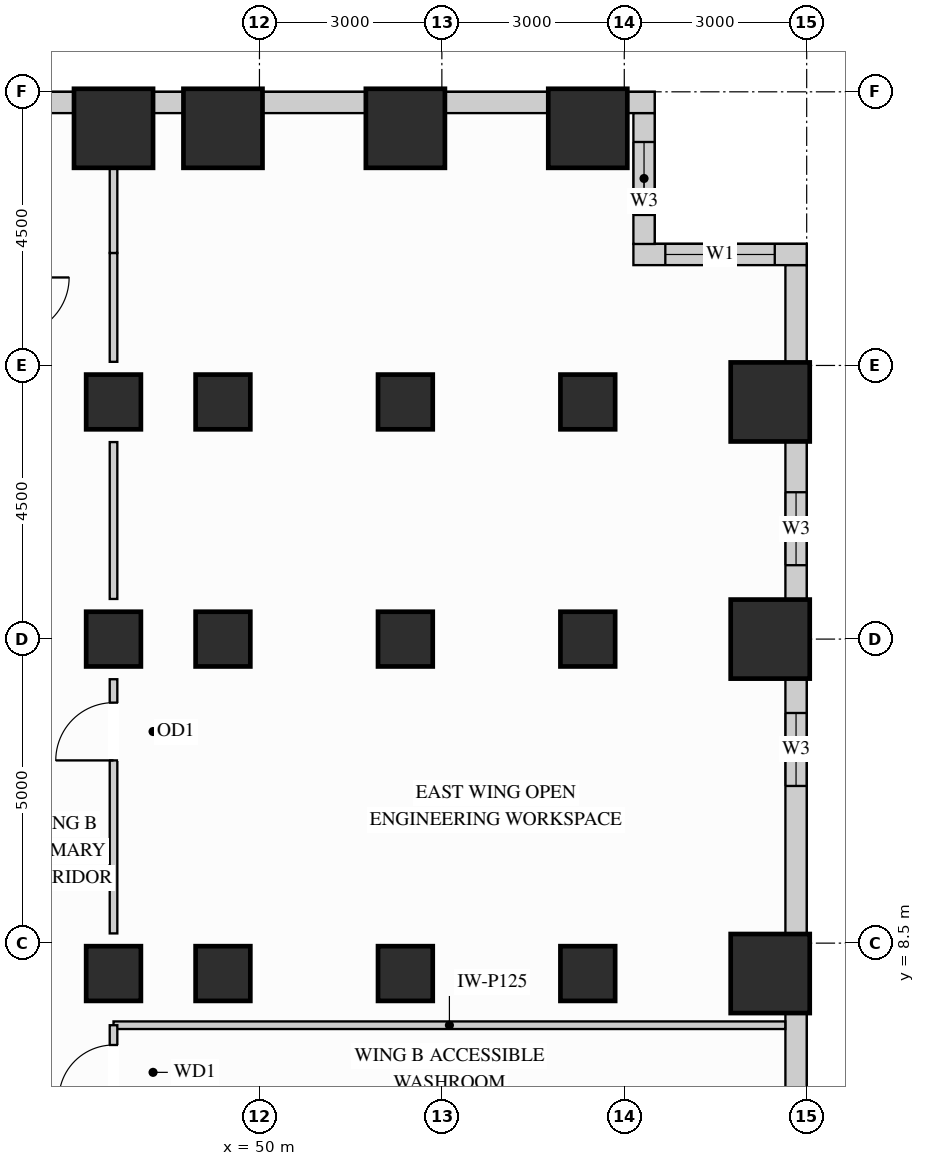
"""IFC4 building model, lengths in metres.
Left out: names, types, materials, properties, quantities, classifications, styles, units other than length and angle.
Written with IfcOpenShell. Run it as: python <this file> out.ifc"""

import sys

from ifc_helpers import new_model, si_unit, direction, frame, frame_2d, origin, origin_2d, place, context, subcontext, project, spatial, rectangle, extrude, source, transform, mapped, element, fill, save


model = new_model("IFC4")
c1 = context("Model", 3, precision=1e-05, world=origin(), true_north=direction((0.0, 1.0)))
c2 = subcontext(c1, "Body", "Model", "MODEL_VIEW")
j1 = project(units=[si_unit("LENGTHUNIT", "METRE"), si_unit("PLANEANGLEUNIT", "RADIAN")], contexts=[c1])
p1 = place(None, origin())
s1 = spatial("IfcSite", under=j1, at=p1, CompositionType="ELEMENT")
p2 = place(p1, origin())
s2 = spatial("IfcBuilding", under=s1, at=p2, CompositionType="ELEMENT")
p3 = place(p2, frame((0.0, 0.0, 44.1)))
s3 = spatial("IfcBuildingStorey", under=s2, at=p3, CompositionType="ELEMENT", Elevation=44.1)
m1 = source(origin(), c2, "Body", "SweptSolid", [
    extrude(rectangle(XDim=0.9, YDim=0.9, at=origin_2d()), origin(), (0.0, 0.0, 1.0), 3.38),
])
for number, where, z_axis, x_axis in (
    (1, (47.6, 13.5, 0.0), (0.0, 0.0, 1.0), (1.0, 0.0, 0.0)),
    (2, (47.6, 8.0, 0.0), (0.0, 0.0, 1.0), (1.0, 0.0, 0.0)),
    (3, (47.6, 17.4, 0.0), (0.0, 0.0, 1.0), (1.0, 0.0, 0.0)),
    (4, (49.4, 13.5, 0.0), (0.0, 0.0, 1.0), (1.0, 0.0, 0.0)),
    (5, (49.4, 17.4, 0.0), (0.0, 0.0, 1.0), (1.0, 0.0, 0.0)),
    (6, (49.4, 8.0, 0.0), (0.0, 0.0, 1.0), (1.0, 0.0, 0.0)),
    (7, (52.4, 13.5, 0.0), (0.0, 0.0, 1.0), (1.0, 0.0, 0.0)),
    (8, (52.4, 17.4, 0.0), (0.0, 0.0, 1.0), (1.0, 0.0, 0.0)),
    (9, (52.4, 8.0, 0.0), (0.0, 0.0, 1.0), (1.0, 0.0, 0.0)),
    (10, (55.4, 13.5, 0.0), (0.0, 0.0, 1.0), (1.0, 0.0, 0.0)),
    (11, (55.4, 17.4, 0.0), (0.0, 0.0, 1.0), (1.0, 0.0, 0.0)),
    (12, (55.4, 8.0, 0.0), (0.0, 0.0, 1.0), (1.0, 0.0, 0.0)),
):
    element("IfcColumn", number, at=place(p3, frame(where, z_axis=z_axis, x_axis=x_axis)), inside=s3, PredefinedType="COLUMN", context=c2, shape_type="MappedRepresentation", body=[
        mapped(m1, transform((0.0, 0.0, 0.0), x_axis=(1.0, 0.0, 0.0), y_axis=(0.0, 1.0, 0.0), z_axis=(0.0, 0.0, 1.0))),
    ])
m2 = source(origin(), c2, "Body", "SweptSolid", [
    extrude(rectangle(XDim=1.3, YDim=1.3, at=origin_2d()), origin(), (0.0, 0.0, 1.0), 3.38),
])
for number, where, z_axis, x_axis in (
    (13, (47.6, 21.9, 0.0), (0.0, 0.0, 1.0), (1.0, 0.0, 0.0)),
    (14, (49.4, 21.9, 0.0), (0.0, 0.0, 1.0), (1.0, 0.0, 0.0)),
    (15, (52.4, 21.9, 0.0), (0.0, 0.0, 1.0), (1.0, 0.0, 0.0)),
    (16, (55.4, 21.9, 0.0), (0.0, 0.0, 1.0), (1.0, 0.0, 0.0)),
    (17, (58.4, 13.5, 0.0), (0.0, 0.0, 1.0), (1.0, 0.0, 0.0)),
    (18, (58.4, 17.4, 0.0), (0.0, 0.0, 1.0), (1.0, 0.0, 0.0)),
    (19, (58.4, 8.0, 0.0), (0.0, 0.0, 1.0), (1.0, 0.0, 0.0)),
):
    element("IfcColumn", number, at=place(p3, frame(where, z_axis=z_axis, x_axis=x_axis)), inside=s3, PredefinedType="COLUMN", context=c2, shape_type="MappedRepresentation", body=[
        mapped(m2, transform((0.0, 0.0, 0.0), x_axis=(1.0, 0.0, 0.0), y_axis=(0.0, 1.0, 0.0), z_axis=(0.0, 0.0, 1.0))),
    ])
m3 = source(origin(), c2, "Body", "SweptSolid", [
    extrude(rectangle(XDim=3.204, YDim=0.35, at=frame_2d((1.602, 0.0))), origin(), (0.0, 0.0, 1.0), 2.51),
])
p4 = place(p3, frame((58.825, 4.148, 0.0), z_axis=(0.0, 0.0, 1.0), x_axis=(0.0, 1.0, 0.0)))
e20 = element("IfcWall", 20, at=p4, inside=s3, PredefinedType="SOLIDWALL", context=c2, shape_type="MappedRepresentation", body=[
    mapped(m3, transform((0.0, 0.0, 0.0), x_axis=(1.0, 0.0, 0.0), y_axis=(0.0, 1.0, 0.0), z_axis=(0.0, 0.0, 1.0))),
])
p5 = place(p3, frame((58.825, 8.648, 0.0), z_axis=(0.0, 0.0, 1.0), x_axis=(0.0, 1.0, 0.0)))
e21 = element("IfcWall", 21, at=p5, inside=s3, PredefinedType="SOLIDWALL", context=c2, shape_type="SweptSolid", body=[
    extrude(rectangle(XDim=4.204, YDim=0.35, at=frame_2d((2.102, 0.0))), origin(), (0.0, 0.0, 1.0), 2.51),
])
p6 = place(p5, frame((2.437, 0.0, 0.78)))
e22 = element("IfcOpeningElement", 22, at=p6, cuts=e21, PredefinedType="OPENING", context=c2, shape_type="SweptSolid", body=[
    extrude(rectangle(XDim=1.2, YDim=1.55, at=frame_2d((0.6, 0.775))), frame((0.0, 0.185, 0.0), z_axis=(0.0, -1.0, 0.0), x_axis=(1.0, 0.0, 0.0)), (0.0, 0.0, 1.0), 0.37),
])
p7 = place(p3, frame((58.825, 14.148, 0.0), z_axis=(0.0, 0.0, 1.0), x_axis=(0.0, 1.0, 0.0)))
e23 = element("IfcWall", 23, at=p7, inside=s3, PredefinedType="SOLIDWALL", context=c2, shape_type="SweptSolid", body=[
    extrude(rectangle(XDim=2.604, YDim=0.35, at=frame_2d((1.302, 0.0))), origin(), (0.0, 0.0, 1.0), 2.51),
])
p8 = place(p7, frame((0.567, 0.0, 0.78)))
e24 = element("IfcOpeningElement", 24, at=p8, cuts=e23, PredefinedType="OPENING", context=c2, shape_type="SweptSolid", body=[
    extrude(rectangle(XDim=1.2, YDim=1.55, at=frame_2d((0.6, 0.775))), frame((0.0, 0.185, 0.0), z_axis=(0.0, -1.0, 0.0), x_axis=(1.0, 0.0, 0.0)), (0.0, 0.0, 1.0), 0.37),
])
m4 = source(origin(), c2, "Body", "SweptSolid", [
    extrude(rectangle(XDim=1.604, YDim=0.35, at=frame_2d((0.802, 0.0))), origin(), (0.0, 0.0, 1.0), 3.365),
])
p9 = place(p3, frame((58.825, 18.048, 0.0), z_axis=(0.0, 0.0, 1.0), x_axis=(0.0, 1.0, 0.0)))
e25 = element("IfcWall", 25, at=p9, inside=s3, PredefinedType="SOLIDWALL", context=c2, shape_type="MappedRepresentation", body=[
    mapped(m4, transform((0.0, 0.0, 0.0), x_axis=(1.0, 0.0, 0.0), y_axis=(0.0, 1.0, 0.0), z_axis=(0.0, 0.0, 1.0))),
])
p10 = place(p3, frame((59.0, 19.825, 0.0), z_axis=(0.0, 0.0, 1.0), x_axis=(-1.0, 0.0, 0.0)))
e26 = element("IfcWall", 26, at=p10, inside=s3, PredefinedType="SOLIDWALL", context=c2, shape_type="SweptSolid", body=[
    extrude(rectangle(XDim=2.85, YDim=0.35, at=frame_2d((1.425, 0.0))), origin(), (0.0, 0.0, 1.0), 3.365),
])
p11 = place(p10, frame((0.525, 0.0, 0.78)))
e27 = element("IfcOpeningElement", 27, at=p11, cuts=e26, PredefinedType="OPENING", context=c2, shape_type="SweptSolid", body=[
    extrude(rectangle(XDim=1.8, YDim=2.1, at=frame_2d((0.9, 1.05))), frame((0.0, 0.185, 0.0), z_axis=(0.0, -1.0, 0.0), x_axis=(1.0, 0.0, 0.0)), (0.0, 0.0, 1.0), 0.37),
])
p12 = place(p3, frame((56.325, 19.998, 0.0), z_axis=(0.0, 0.0, 1.0), x_axis=(0.0, 1.0, 0.0)))
e28 = element("IfcWall", 28, at=p12, inside=s3, PredefinedType="SOLIDWALL", context=c2, shape_type="SweptSolid", body=[
    extrude(rectangle(XDim=2.154, YDim=0.35, at=frame_2d((1.077, 0.0))), origin(), (0.0, 0.0, 1.0), 3.365),
])
p13 = place(p12, frame((0.477, 0.0, 0.78)))
e29 = element("IfcOpeningElement", 29, at=p13, cuts=e28, PredefinedType="OPENING", context=c2, shape_type="SweptSolid", body=[
    extrude(rectangle(XDim=1.2, YDim=2.1, at=frame_2d((0.6, 1.05))), frame((0.0, 0.185, 0.0), z_axis=(0.0, -1.0, 0.0), x_axis=(1.0, 0.0, 0.0)), (0.0, 0.0, 1.0), 0.37),
])
m5 = source(origin(), c2, "Body", "SweptSolid", [
    extrude(rectangle(XDim=0.452, YDim=0.35, at=frame_2d((0.226, 0.0))), origin(), (0.0, 0.0, 1.0), 3.365),
])
p14 = place(p3, frame((56.5, 22.325, 0.0), z_axis=(0.0, 0.0, 1.0), x_axis=(-1.0, 0.0, 0.0)))
e30 = element("IfcWall", 30, at=p14, inside=s3, PredefinedType="SOLIDWALL", context=c2, shape_type="MappedRepresentation", body=[
    mapped(m5, transform((0.0, 0.0, 0.0), x_axis=(1.0, 0.0, 0.0), y_axis=(0.0, 1.0, 0.0), z_axis=(0.0, 0.0, 1.0))),
])
m6 = source(origin(), c2, "Body", "SweptSolid", [
    extrude(rectangle(XDim=1.704, YDim=0.35, at=frame_2d((0.852, 0.0))), origin(), (0.0, 0.0, 1.0), 2.51),
])
for number, where, z_axis, x_axis in (
    (31, (54.752, 22.325, 0.0), (0.0, 0.0, 1.0), (-1.0, 0.0, 0.0)),
    (32, (51.752, 22.325, 0.0), (0.0, 0.0, 1.0), (-1.0, 0.0, 0.0)),
):
    element("IfcWall", number, at=place(p3, frame(where, z_axis=z_axis, x_axis=x_axis)), inside=s3, PredefinedType="SOLIDWALL", context=c2, shape_type="MappedRepresentation", body=[
        mapped(m6, transform((0.0, 0.0, 0.0), x_axis=(1.0, 0.0, 0.0), y_axis=(0.0, 1.0, 0.0), z_axis=(0.0, 0.0, 1.0))),
    ])
m7 = source(origin(), c2, "Body", "SweptSolid", [
    extrude(rectangle(XDim=0.504, YDim=0.35, at=frame_2d((0.252, 0.0))), origin(), (0.0, 0.0, 1.0), 3.365),
])
p15 = place(p3, frame((48.752, 22.325, 0.0), z_axis=(0.0, 0.0, 1.0), x_axis=(-1.0, 0.0, 0.0)))
e33 = element("IfcWall", 33, at=p15, inside=s3, PredefinedType="SOLIDWALL", context=c2, shape_type="MappedRepresentation", body=[
    mapped(m7, transform((0.0, 0.0, 0.0), x_axis=(1.0, 0.0, 0.0), y_axis=(0.0, 1.0, 0.0), z_axis=(0.0, 0.0, 1.0))),
])
p16 = place(p3, frame((46.952, 22.325, 0.0), z_axis=(0.0, 0.0, 1.0), x_axis=(-1.0, 0.0, 0.0)))
e34 = element("IfcWall", 34, at=p16, inside=s3, PredefinedType="SOLIDWALL", context=c2, shape_type="SweptSolid", body=[
    extrude(rectangle(XDim=6.304, YDim=0.35, at=frame_2d((3.152, 0.0))), origin(), (0.0, 0.0, 1.0), 2.51),
])
p17 = place(p16, frame((1.649, 0.0, 0.78)))
e35 = element("IfcOpeningElement", 35, at=p17, cuts=e34, PredefinedType="OPENING", context=c2, shape_type="SweptSolid", body=[
    extrude(rectangle(XDim=1.8, YDim=1.55, at=frame_2d((0.9, 0.775))), frame((0.0, 0.185, 0.0), z_axis=(0.0, -1.0, 0.0), x_axis=(1.0, 0.0, 0.0)), (0.0, 0.0, 1.0), 0.37),
])
p18 = place(p16, frame((3.817, 0.0, 0.78)))
e36 = element("IfcOpeningElement", 36, at=p18, cuts=e34, PredefinedType="OPENING", context=c2, shape_type="SweptSolid", body=[
    extrude(rectangle(XDim=1.8, YDim=1.55, at=frame_2d((0.9, 0.775))), frame((0.0, 0.185, 0.0), z_axis=(0.0, -1.0, 0.0), x_axis=(1.0, 0.0, 0.0)), (0.0, 0.0, 1.0), 0.37),
])
m8 = source(origin(), c2, "Body", "SweptSolid", [
    extrude(rectangle(XDim=11.048, YDim=0.125, at=frame_2d((5.524, 0.0))), origin(), (0.0, 0.0, 1.0), 3.365),
])
p19 = place(p3, frame((47.6, 7.15, 0.0), z_axis=(0.0, 0.0, 1.0), x_axis=(1.0, 0.0, 0.0)))
e37 = element("IfcWall", 37, at=p19, inside=s3, PredefinedType="PARTITIONING", context=c2, shape_type="MappedRepresentation", body=[
    mapped(m8, transform((0.0, 0.0, 0.0), x_axis=(1.0, 0.0, 0.0), y_axis=(0.0, 1.0, 0.0), z_axis=(0.0, 0.0, 1.0))),
])
p20 = place(p3, frame((47.6, 8.66, 0.0), z_axis=(0.0, 0.0, 1.0), x_axis=(0.0, 1.0, 0.0)))
e38 = element("IfcWall", 38, at=p20, inside=s3, PredefinedType="PARTITIONING", context=c2, shape_type="SweptSolid", body=[
    extrude(rectangle(XDim=4.18, YDim=0.125, at=frame_2d((2.09, 0.0))), origin(), (0.0, 0.0, 1.0), 2.67),
])
p21 = place(p20, frame((2.845, 0.0, 0.0)))
e39 = element("IfcOpeningElement", 39, at=p21, cuts=e38, PredefinedType="OPENING", context=c2, shape_type="SweptSolid", body=[
    extrude(rectangle(XDim=0.95, YDim=2.15, at=frame_2d((0.475, 1.075))), frame((0.0, 0.073, 0.0), z_axis=(0.0, -1.0, 0.0), x_axis=(1.0, 0.0, 0.0)), (0.0, 0.0, 1.0), 0.145),
])
m9 = source(origin(), c2, "Body", "SweptSolid", [
    extrude(rectangle(XDim=2.58, YDim=0.125, at=frame_2d((1.29, 0.0))), origin(), (0.0, 0.0, 1.0), 2.67),
])
p22 = place(p3, frame((47.6, 14.16, 0.0), z_axis=(0.0, 0.0, 1.0), x_axis=(0.0, 1.0, 0.0)))
e40 = element("IfcWall", 40, at=p22, inside=s3, PredefinedType="PARTITIONING", context=c2, shape_type="MappedRepresentation", body=[
    mapped(m9, transform((0.0, 0.0, 0.0), x_axis=(1.0, 0.0, 0.0), y_axis=(0.0, 1.0, 0.0), z_axis=(0.0, 0.0, 1.0))),
])
m10 = source(origin(), c2, "Body", "SweptSolid", [
    extrude(rectangle(XDim=1.79, YDim=0.125, at=frame_2d((0.895, 0.0))), origin(), (0.0, 0.0, 1.0), 2.67),
])
p23 = place(p3, frame((47.6, 18.06, 0.0), z_axis=(0.0, 0.0, 1.0), x_axis=(0.0, 1.0, 0.0)))
e41 = element("IfcWall", 41, at=p23, inside=s3, PredefinedType="PARTITIONING", context=c2, shape_type="MappedRepresentation", body=[
    mapped(m10, transform((0.0, 0.0, 0.0), x_axis=(1.0, 0.0, 0.0), y_axis=(0.0, 1.0, 0.0), z_axis=(0.0, 0.0, 1.0))),
])
m11 = source(origin(), c2, "Body", "SweptSolid", [
    extrude(rectangle(XDim=1.39, YDim=0.125, at=frame_2d((0.695, 0.0))), origin(), (0.0, 0.0, 1.0), 2.67),
])
p24 = place(p3, frame((47.6, 19.85, 0.0), z_axis=(0.0, 0.0, 1.0), x_axis=(0.0, 1.0, 0.0)))
e42 = element("IfcWall", 42, at=p24, inside=s3, PredefinedType="PARTITIONING", context=c2, shape_type="MappedRepresentation", body=[
    mapped(m11, transform((0.0, 0.0, 0.0), x_axis=(1.0, 0.0, 0.0), y_axis=(0.0, 1.0, 0.0), z_axis=(0.0, 0.0, 1.0))),
])
p25 = place(p3, frame((47.6, 5.65, 0.0), z_axis=(0.0, 0.0, 1.0), x_axis=(0.0, 1.0, 0.0)))
e43 = element("IfcWall", 43, at=p25, inside=s3, PredefinedType="PARTITIONING", context=c2, shape_type="SweptSolid", body=[
    extrude(rectangle(XDim=1.5, YDim=0.125, at=frame_2d((0.75, 0.0))), origin(), (0.0, 0.0, 1.0), 2.67),
])
p26 = place(p25, frame((0.275, 0.0, 0.0)))
e44 = element("IfcOpeningElement", 44, at=p26, cuts=e43, PredefinedType="OPENING", context=c2, shape_type="SweptSolid", body=[
    extrude(rectangle(XDim=0.9, YDim=2.15, at=frame_2d((0.45, 1.075))), frame((0.0, 0.073, 0.0), z_axis=(0.0, -1.0, 0.0), x_axis=(1.0, 0.0, 0.0)), (0.0, 0.0, 1.0), 0.145),
])
m12 = source(origin(), c2, "Body", "SweptSolid", [
    extrude(rectangle(XDim=0.95, YDim=2.15, at=frame_2d((0.475, 1.075))), frame((0.0, 0.025, 0.0), z_axis=(0.0, -1.0, 0.0), x_axis=(1.0, 0.0, 0.0)), (0.0, 0.0, 1.0), 0.05),
])
p27 = place(p21, origin())
e45 = element("IfcDoor", 45, at=p27, inside=s3, OperationType="SINGLE_SWING_LEFT", PredefinedType="DOOR", context=c2, shape_type="MappedRepresentation", body=[
    mapped(m12, transform((0.0, 0.0, 0.0), x_axis=(1.0, 0.0, 0.0), y_axis=(0.0, 1.0, 0.0), z_axis=(0.0, 0.0, 1.0))),
])
fill(e39, e45)
m13 = source(origin(), c2, "Body", "SweptSolid", [
    extrude(rectangle(XDim=0.9, YDim=2.15, at=frame_2d((0.45, 1.075))), frame((0.0, 0.025, 0.0), z_axis=(0.0, -1.0, 0.0), x_axis=(1.0, 0.0, 0.0)), (0.0, 0.0, 1.0), 0.05),
])
p28 = place(p26, origin())
e46 = element("IfcDoor", 46, at=p28, inside=s3, OperationType="SINGLE_SWING_LEFT", PredefinedType="DOOR", context=c2, shape_type="MappedRepresentation", body=[
    mapped(m13, transform((0.0, 0.0, 0.0), x_axis=(1.0, 0.0, 0.0), y_axis=(0.0, 1.0, 0.0), z_axis=(0.0, 0.0, 1.0))),
])
fill(e44, e46)
m14 = source(origin(), c2, "Body", "SweptSolid", [
    extrude(rectangle(XDim=1.8, YDim=2.1, at=frame_2d((0.9, 1.05))), frame((0.0, 0.03, 0.0), z_axis=(0.0, -1.0, 0.0), x_axis=(1.0, 0.0, 0.0)), (0.0, 0.0, 1.0), 0.06),
])
p29 = place(p11, origin())
e47 = element("IfcWindow", 47, at=p29, inside=s3, PartitioningType="SINGLE_PANEL", PredefinedType="WINDOW", context=c2, shape_type="MappedRepresentation", body=[
    mapped(m14, transform((0.0, 0.0, 0.0), x_axis=(1.0, 0.0, 0.0), y_axis=(0.0, 1.0, 0.0), z_axis=(0.0, 0.0, 1.0))),
])
fill(e27, e47)
m15 = source(origin(), c2, "Body", "SweptSolid", [
    extrude(rectangle(XDim=1.2, YDim=1.55, at=frame_2d((0.6, 0.775))), frame((0.0, 0.03, 0.0), z_axis=(0.0, -1.0, 0.0), x_axis=(1.0, 0.0, 0.0)), (0.0, 0.0, 1.0), 0.06),
])
p30 = place(p6, origin())
e48 = element("IfcWindow", 48, at=p30, inside=s3, PartitioningType="SINGLE_PANEL", PredefinedType="WINDOW", context=c2, shape_type="MappedRepresentation", body=[
    mapped(m15, transform((0.0, 0.0, 0.0), x_axis=(1.0, 0.0, 0.0), y_axis=(0.0, 1.0, 0.0), z_axis=(0.0, 0.0, 1.0))),
])
fill(e22, e48)
p31 = place(p8, origin())
e49 = element("IfcWindow", 49, at=p31, inside=s3, PartitioningType="SINGLE_PANEL", PredefinedType="WINDOW", context=c2, shape_type="MappedRepresentation", body=[
    mapped(m15, transform((0.0, 0.0, 0.0), x_axis=(1.0, 0.0, 0.0), y_axis=(0.0, 1.0, 0.0), z_axis=(0.0, 0.0, 1.0))),
])
fill(e24, e49)
m16 = source(origin(), c2, "Body", "SweptSolid", [
    extrude(rectangle(XDim=1.2, YDim=2.1, at=frame_2d((0.6, 1.05))), frame((0.0, 0.03, 0.0), z_axis=(0.0, -1.0, 0.0), x_axis=(1.0, 0.0, 0.0)), (0.0, 0.0, 1.0), 0.06),
])
p32 = place(p13, origin())
e50 = element("IfcWindow", 50, at=p32, inside=s3, PartitioningType="SINGLE_PANEL", PredefinedType="WINDOW", context=c2, shape_type="MappedRepresentation", body=[
    mapped(m16, transform((0.0, 0.0, 0.0), x_axis=(1.0, 0.0, 0.0), y_axis=(0.0, 1.0, 0.0), z_axis=(0.0, 0.0, 1.0))),
])
fill(e29, e50)
save(model, sys.argv[1])
